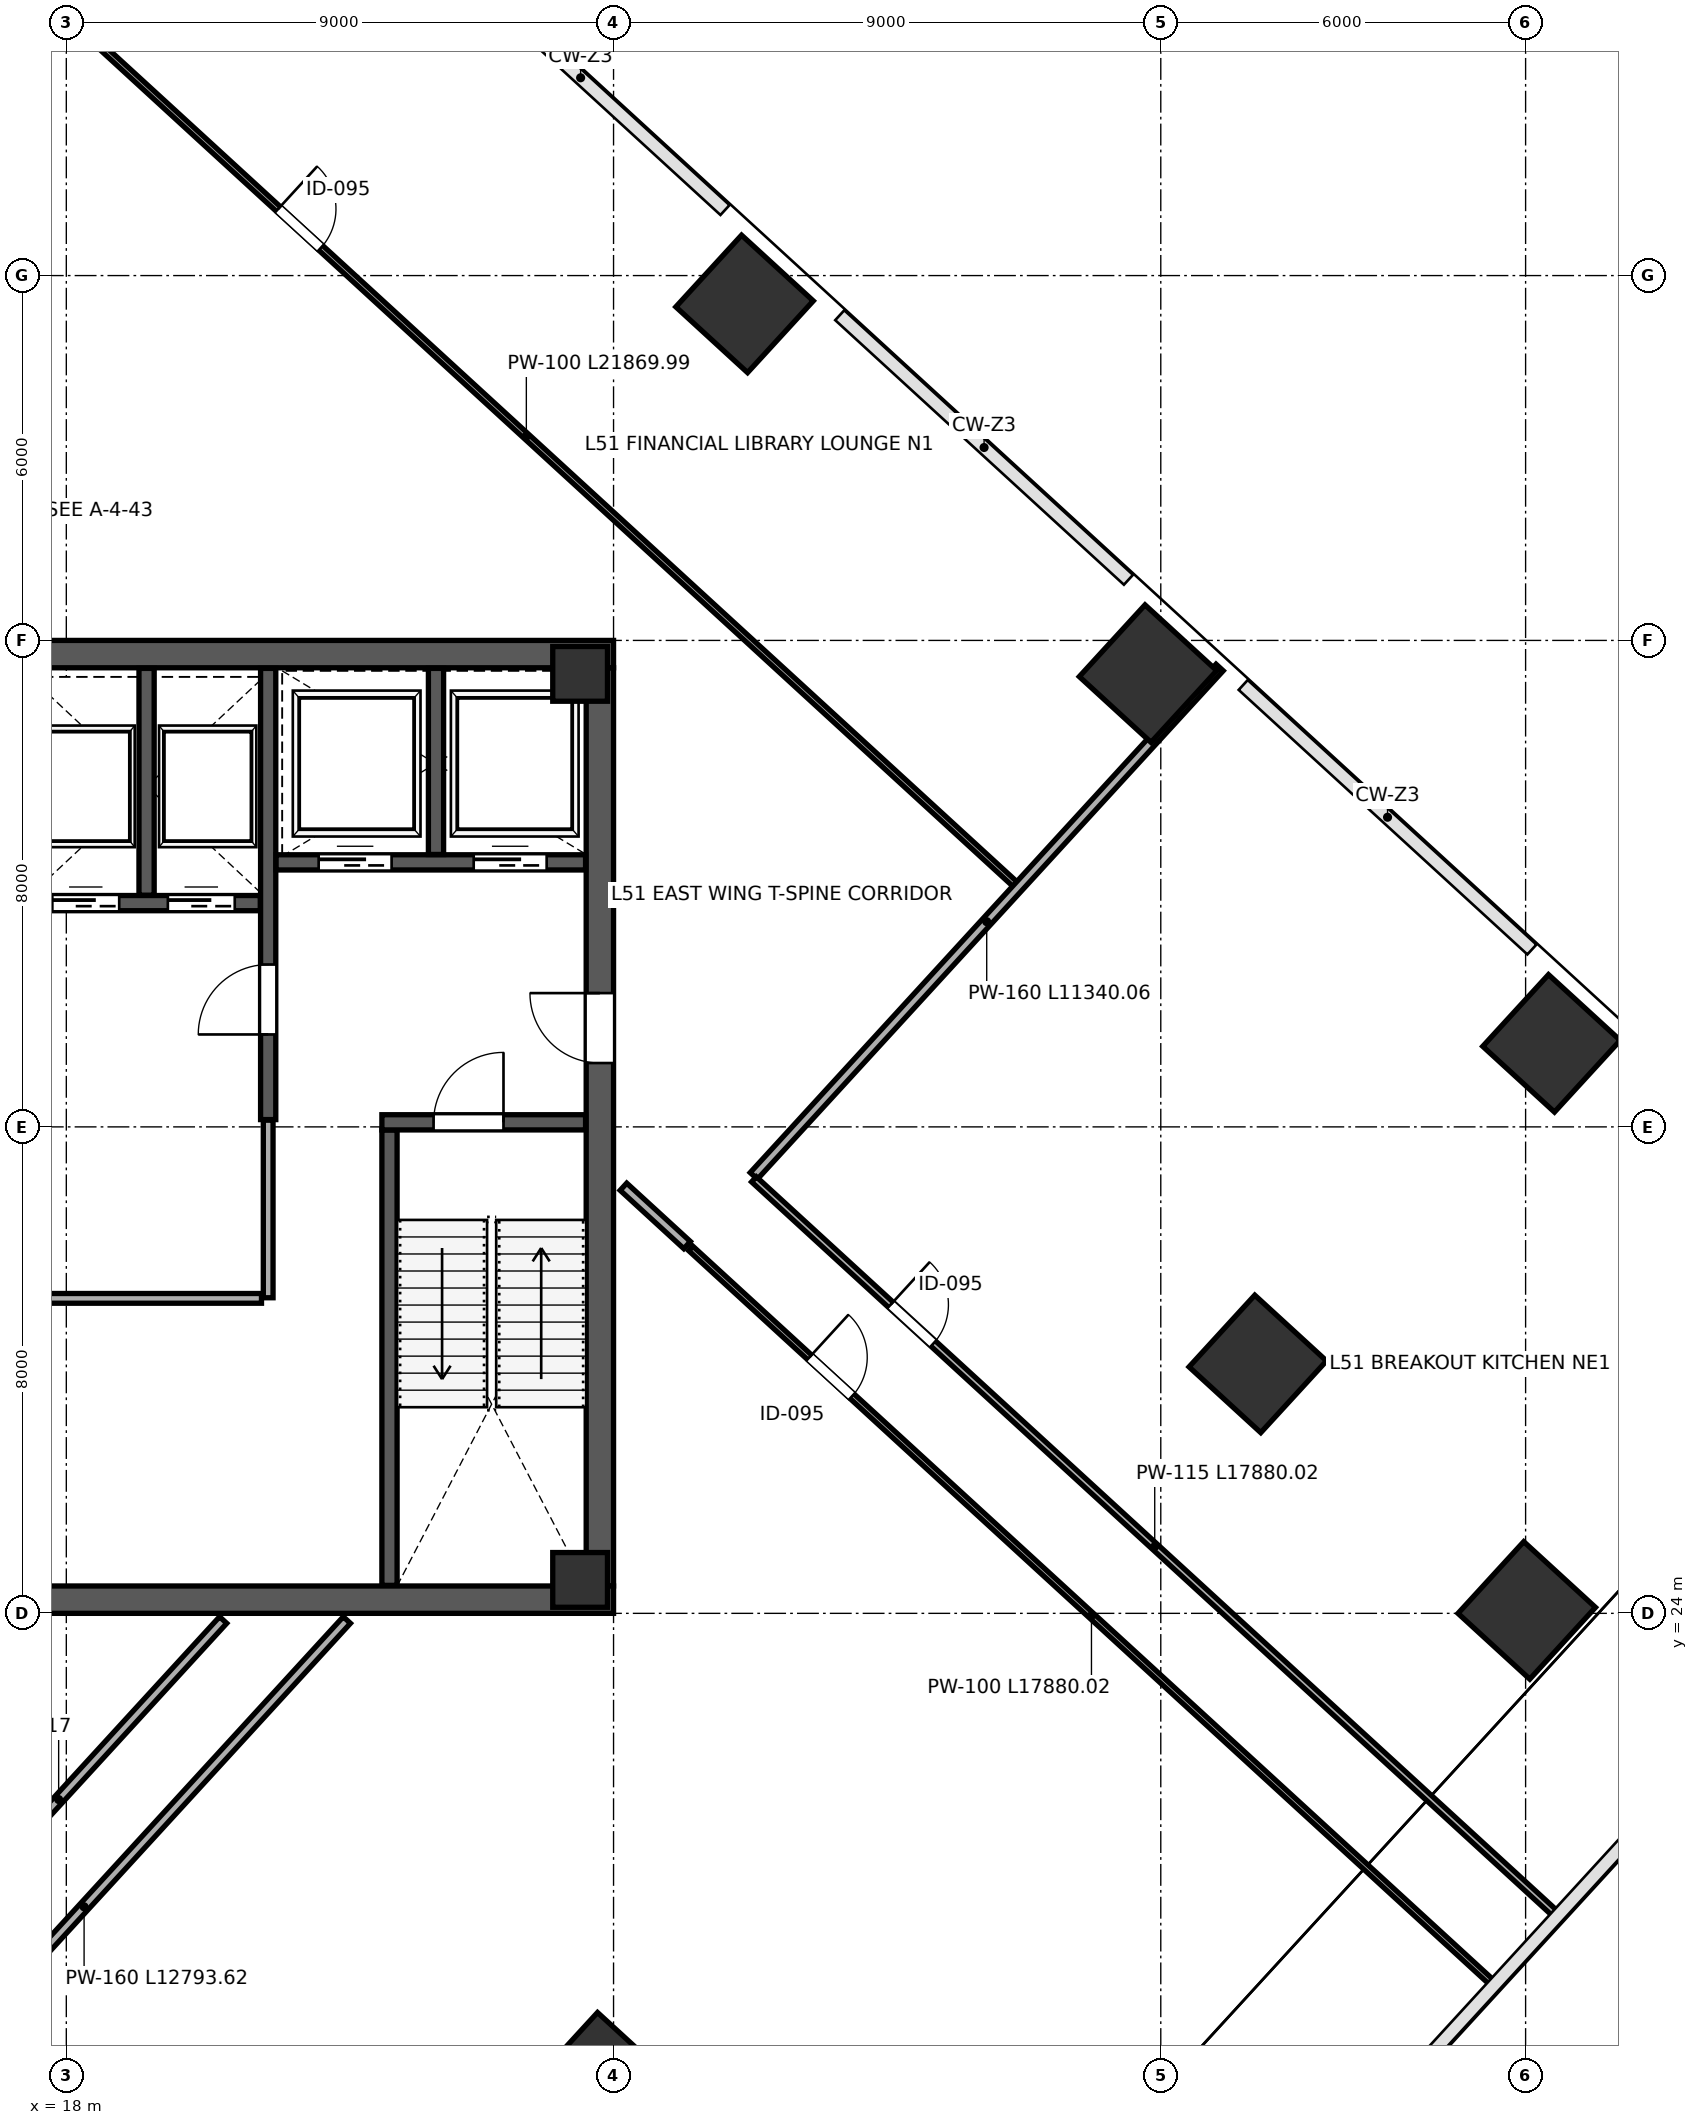
"""IFC4 building model, lengths in metres.
Left out: names, types, materials, properties, quantities, classifications, styles, units other than length and angle.
Written with IfcOpenShell. Run it as: python <this file> out.ifc"""

import sys

from ifc_helpers import new_model, si_unit, direction, frame, frame_2d, origin, origin_2d, place, context, subcontext, project, spatial, rectangle, extrude, source, transform, mapped, element, fill, save


model = new_model("IFC4")
c1 = context("Model", 3, precision=1e-05, world=origin(), true_north=direction((0.0, 1.0)))
c2 = subcontext(c1, "Body", "Model", "MODEL_VIEW")
j1 = project(units=[si_unit("LENGTHUNIT", "METRE"), si_unit("PLANEANGLEUNIT", "RADIAN")], contexts=[c1])
p1 = place(None, origin())
s1 = spatial("IfcSite", under=j1, at=p1, CompositionType="ELEMENT")
p2 = place(p1, origin())
s2 = spatial("IfcBuilding", under=s1, at=p2, CompositionType="ELEMENT")
p3 = place(p2, frame((0.0, 0.0, 229.0)))
s3 = spatial("IfcBuildingStorey", under=s2, at=p3, CompositionType="ELEMENT", Elevation=229.0)
m1 = source(origin(), c2, "Body", "SweptSolid", [
    extrude(rectangle(XDim=0.9, YDim=0.9, at=origin_2d()), origin(), (0.0, 0.0, 1.0), 4.198),
])
for number, where, z_axis, x_axis in (
    (1, (26.45, 24.55, 0.001), (0.0, 0.0, 1.0), (1.0, 0.0, 0.0)),
    (2, (26.45, 39.45, 0.001), (0.0, 0.0, 1.0), (1.0, 0.0, 0.0)),
):
    element("IfcColumn", number, at=place(p3, frame(where, z_axis=z_axis, x_axis=x_axis)), inside=s3, PredefinedType="COLUMN", context=c2, shape_type="MappedRepresentation", body=[
        mapped(m1, transform((0.0, 0.0, 0.0), scale=1.0)),
    ])
m2 = source(origin(), c2, "Body", "SweptSolid", [
    extrude(rectangle(XDim=1.6, YDim=1.6, at=origin_2d()), origin(), (0.0, 0.0, 1.0), 4.198),
])
for number, where, z_axis, x_axis in (
    (3, (29.155, 45.534, 0.001), (0.0, 0.0, 1.0), (-0.737, 0.676, 0.0)),
    (4, (35.79, 39.454, 0.001), (0.0, 0.0, 1.0), (-0.737, 0.676, 0.0)),
):
    element("IfcColumn", number, at=place(p3, frame(where, z_axis=z_axis, x_axis=x_axis)), inside=s3, PredefinedType="COLUMN", context=c2, shape_type="MappedRepresentation", body=[
        mapped(m2, transform((0.0, 0.0, 0.0), scale=1.0)),
    ])
m3 = source(origin(), c2, "Body", "SweptSolid", [
    extrude(rectangle(XDim=1.6, YDim=1.6, at=origin_2d()), origin(), (0.0, 0.0, 1.0), 4.198),
])
for number, where, z_axis, x_axis in (
    (5, (26.786, 16.306, 0.001), (0.0, 0.0, 1.0), (-0.737, 0.676, 0.0)),
    (6, (37.595, 28.102, 0.001), (0.0, 0.0, 1.0), (-0.737, 0.676, 0.0)),
):
    element("IfcColumn", number, at=place(p3, frame(where, z_axis=z_axis, x_axis=x_axis)), inside=s3, PredefinedType="COLUMN", context=c2, shape_type="MappedRepresentation", body=[
        mapped(m3, transform((0.0, 0.0, 0.0), scale=1.0)),
    ])
for number, where, z_axis, x_axis in (
    (7, (42.426, 33.374, 0.001), (0.0, 0.0, 1.0), (-0.737, 0.676, 0.0)),
    (8, (42.019, 24.049, 0.001), (0.0, 0.0, 1.0), (-0.737, 0.676, 0.0)),
):
    element("IfcColumn", number, at=place(p3, frame(where, z_axis=z_axis, x_axis=x_axis)), inside=s3, PredefinedType="COLUMN", context=c2, shape_type="MappedRepresentation", body=[
        mapped(m2, transform((0.0, 0.0, 0.0), scale=1.0)),
    ])
p4 = place(p3, frame((26.775, 24.45, 0.0), z_axis=(0.0, 0.0, 1.0), x_axis=(0.0, 1.0, 0.0)))
e9 = element("IfcWall", 9, at=p4, inside=s3, PredefinedType="SHEAR", context=c2, shape_type="SweptSolid", body=[
    extrude(rectangle(XDim=15.1, YDim=0.45, at=frame_2d((7.55, 0.0))), origin(), (0.0, 0.0, 1.0), 3.96),
])
p5 = place(p4, frame((8.6, 0.0, 0.0)))
e10 = element("IfcOpeningElement", 10, at=p5, cuts=e9, PredefinedType="OPENING", context=c2, shape_type="SweptSolid", body=[
    extrude(rectangle(XDim=1.15, YDim=2.2, at=frame_2d((0.575, 1.1))), frame((0.0, 0.235, 0.0), z_axis=(0.0, -1.0, 0.0), x_axis=(1.0, 0.0, 0.0)), (0.0, 0.0, 1.0), 0.47),
])
for number, where, z_axis, x_axis in (
    (11, (9.0, 24.225, 0.0), (0.0, 0.0, 1.0), (1.0, 0.0, 0.0)),
    (12, (9.0, 39.775, 0.0), (0.0, 0.0, 1.0), (1.0, 0.0, 0.0)),
):
    element("IfcWall", number, at=place(p3, frame(where, z_axis=z_axis, x_axis=x_axis)), inside=s3, PredefinedType="SHEAR", context=c2, shape_type="SweptSolid", body=[
        extrude(rectangle(XDim=18.0, YDim=0.45, at=frame_2d((9.0, 0.0))), origin(), (0.0, 0.0, 1.0), 3.96),
    ])
p6 = place(p3, frame((23.315, 24.46, 0.0), z_axis=(0.0, 0.0, 1.0), x_axis=(0.0, 1.0, 0.0)))
e13 = element("IfcWall", 13, at=p6, inside=s3, PredefinedType="SHEAR", context=c2, shape_type="SweptSolid", body=[
    extrude(rectangle(XDim=7.49, YDim=0.25, at=frame_2d((3.745, 0.0))), origin(), (0.0, 0.0, 1.0), 3.96),
])
p7 = place(p3, frame((23.19, 32.075, 0.0), z_axis=(0.0, 0.0, 1.0), x_axis=(1.0, 0.0, 0.0)))
e14 = element("IfcWall", 14, at=p7, inside=s3, PredefinedType="SHEAR", context=c2, shape_type="SweptSolid", body=[
    extrude(rectangle(XDim=3.35, YDim=0.25, at=frame_2d((1.675, 0.0))), origin(), (0.0, 0.0, 1.0), 3.96),
])
p8 = place(p7, frame((0.85, 0.0, 0.0)))
e15 = element("IfcOpeningElement", 15, at=p8, cuts=e14, PredefinedType="OPENING", context=c2, shape_type="SweptSolid", body=[
    extrude(rectangle(XDim=1.15, YDim=2.2, at=frame_2d((0.575, 1.1))), frame((0.0, 0.135, 0.0), z_axis=(0.0, -1.0, 0.0), x_axis=(1.0, 0.0, 0.0)), (0.0, 0.0, 1.0), 0.27),
])
p9 = place(p3, frame((21.32, 32.12, 0.0), z_axis=(0.0, 0.0, 1.0), x_axis=(0.0, 1.0, 0.0)))
e16 = element("IfcWall", 16, at=p9, inside=s3, PredefinedType="SHEAR", context=c2, shape_type="SweptSolid", body=[
    extrude(rectangle(XDim=7.42, YDim=0.25, at=frame_2d((3.71, 0.0))), origin(), (0.0, 0.0, 1.0), 3.96),
])
p10 = place(p9, frame((1.4, 0.0, 0.0)))
e17 = element("IfcOpeningElement", 17, at=p10, cuts=e16, PredefinedType="OPENING", context=c2, shape_type="SweptSolid", body=[
    extrude(rectangle(XDim=1.15, YDim=2.2, at=frame_2d((0.575, 1.1))), frame((0.0, 0.135, 0.0), z_axis=(0.0, -1.0, 0.0), x_axis=(1.0, 0.0, 0.0)), (0.0, 0.0, 1.0), 0.27),
])
p11 = place(p3, frame((21.45, 36.35, 0.0), z_axis=(0.0, 0.0, 1.0), x_axis=(1.0, 0.0, 0.0)))
e18 = element("IfcWall", 18, at=p11, inside=s3, PredefinedType="SHEAR", context=c2, shape_type="SweptSolid", body=[
    extrude(rectangle(XDim=5.09, YDim=0.25, at=frame_2d((2.545, 0.0))), origin(), (0.0, 0.0, 1.0), 3.96),
])
p12 = place(p11, frame((0.7, 0.0, 0.0)))
e19 = element("IfcOpeningElement", 19, at=p12, cuts=e18, PredefinedType="OPENING", context=c2, shape_type="SweptSolid", body=[
    extrude(rectangle(XDim=1.2, YDim=2.2, at=frame_2d((0.6, 1.1))), frame((0.0, 0.135, 0.0), z_axis=(0.0, -1.0, 0.0), x_axis=(1.0, 0.0, 0.0)), (0.0, 0.0, 1.0), 0.27),
])
p13 = place(p11, frame((3.25, 0.0, 0.0)))
e20 = element("IfcOpeningElement", 20, at=p13, cuts=e18, PredefinedType="OPENING", context=c2, shape_type="SweptSolid", body=[
    extrude(rectangle(XDim=1.2, YDim=2.2, at=frame_2d((0.6, 1.1))), frame((0.0, 0.135, 0.0), z_axis=(0.0, -1.0, 0.0), x_axis=(1.0, 0.0, 0.0)), (0.0, 0.0, 1.0), 0.27),
])
p14 = place(p3, frame((24.08, 36.48, 0.0), z_axis=(0.0, 0.0, 1.0), x_axis=(0.0, 1.0, 0.0)))
e21 = element("IfcWall", 21, at=p14, inside=s3, PredefinedType="SHEAR", context=c2, shape_type="SweptSolid", body=[
    extrude(rectangle(XDim=3.06, YDim=0.25, at=frame_2d((1.53, 0.0))), origin(), (0.0, 0.0, 1.0), 3.96),
])
p15 = place(p3, frame((17.32, 35.68, 0.0), z_axis=(0.0, 0.0, 1.0), x_axis=(1.0, 0.0, 0.0)))
e22 = element("IfcWall", 22, at=p15, inside=s3, PredefinedType="SHEAR", context=c2, shape_type="SweptSolid", body=[
    extrude(rectangle(XDim=3.87, YDim=0.25, at=frame_2d((1.935, 0.0))), origin(), (0.0, 0.0, 1.0), 3.96),
])
p16 = place(p15, frame((0.45, 0.0, 0.0)))
e23 = element("IfcOpeningElement", 23, at=p16, cuts=e22, PredefinedType="OPENING", context=c2, shape_type="SweptSolid", body=[
    extrude(rectangle(XDim=1.1, YDim=2.2, at=frame_2d((0.55, 1.1))), frame((0.0, 0.135, 0.0), z_axis=(0.0, -1.0, 0.0), x_axis=(1.0, 0.0, 0.0)), (0.0, 0.0, 1.0), 0.27),
])
p17 = place(p15, frame((2.35, 0.0, 0.0)))
e24 = element("IfcOpeningElement", 24, at=p17, cuts=e22, PredefinedType="OPENING", context=c2, shape_type="SweptSolid", body=[
    extrude(rectangle(XDim=1.1, YDim=2.2, at=frame_2d((0.55, 1.1))), frame((0.0, 0.135, 0.0), z_axis=(0.0, -1.0, 0.0), x_axis=(1.0, 0.0, 0.0)), (0.0, 0.0, 1.0), 0.27),
])
p18 = place(p3, frame((19.32, 35.81, 0.0), z_axis=(0.0, 0.0, 1.0), x_axis=(0.0, 1.0, 0.0)))
e25 = element("IfcWall", 25, at=p18, inside=s3, PredefinedType="SHEAR", context=c2, shape_type="SweptSolid", body=[
    extrude(rectangle(XDim=3.73, YDim=0.25, at=frame_2d((1.865, 0.0))), origin(), (0.0, 0.0, 1.0), 3.96),
])
p19 = place(p3, frame((12.84, 29.18, 0.0), z_axis=(0.0, 0.0, 1.0), x_axis=(1.0, 0.0, 0.0)))
e26 = element("IfcWall", 26, at=p19, inside=s3, PredefinedType="PARTITIONING", context=c2, shape_type="SweptSolid", body=[
    extrude(rectangle(XDim=8.37, YDim=0.16, at=frame_2d((4.185, 0.0))), origin(), (0.0, 0.0, 1.0), 3.96),
])
p20 = place(p19, frame((2.6, 0.0, 0.0)))
e27 = element("IfcOpeningElement", 27, at=p20, cuts=e26, PredefinedType="OPENING", context=c2, shape_type="SweptSolid", body=[
    extrude(rectangle(XDim=0.9, YDim=2.15, at=frame_2d((0.45, 1.075))), frame((0.0, 0.09, 0.0), z_axis=(0.0, -1.0, 0.0), x_axis=(1.0, 0.0, 0.0)), (0.0, 0.0, 1.0), 0.18),
])
p21 = place(p3, frame((21.32, 29.19, 0.0), z_axis=(0.0, 0.0, 1.0), x_axis=(0.0, 1.0, 0.0)))
e28 = element("IfcWall", 28, at=p21, inside=s3, PredefinedType="PARTITIONING", context=c2, shape_type="SweptSolid", body=[
    extrude(rectangle(XDim=2.92, YDim=0.16, at=frame_2d((1.46, 0.0))), origin(), (0.0, 0.0, 1.0), 3.96),
])
p22 = place(p3, frame((15.168, 17.986, 0.0), z_axis=(0.0, 0.0, 1.0), x_axis=(0.675616954369, 0.737252827034, 0.0)))
e29 = element("IfcWall", 29, at=p22, inside=s3, PredefinedType="PARTITIONING", context=c2, shape_type="SweptSolid", body=[
    extrude(rectangle(XDim=8.009, YDim=0.16, at=frame_2d((4.005, 0.0))), origin(), (0.0, 0.0, 1.0), 3.96),
])
p23 = place(p3, frame((27.163, 31.016, 0.0), z_axis=(0.0, 0.0, 1.0), x_axis=(0.737296869908, -0.675568890361, 0.0)))
e30 = element("IfcWall", 30, at=p23, inside=s3, PredefinedType="PARTITIONING", context=c2, shape_type="SweptSolid", body=[
    extrude(rectangle(XDim=1.42, YDim=0.16, at=frame_2d((0.71, 0.0))), origin(), (0.0, 0.0, 1.0), 3.96),
])
p24 = place(p3, frame((17.504, 50.744, 0.0), z_axis=(0.0, 0.0, 1.0), x_axis=(0.737277850523, -0.675589646996, 0.0)))
e31 = element("IfcWall", 31, at=p24, inside=s3, PredefinedType="PARTITIONING", context=c2, shape_type="SweptSolid", body=[
    extrude(rectangle(XDim=21.87, YDim=0.1, at=frame_2d((10.935, 0.0))), origin(), (0.0, 0.0, 1.0), 3.96),
])
p25 = place(p24, frame((5.4, 0.0, 0.0)))
e32 = element("IfcOpeningElement", 32, at=p25, cuts=e31, PredefinedType="OPENING", context=c2, shape_type="SweptSolid", body=[
    extrude(rectangle(XDim=0.95, YDim=2.15, at=frame_2d((0.475, 1.075))), frame((0.0, 0.06, 0.0), z_axis=(0.0, -1.0, 0.0), x_axis=(1.0, 0.0, 0.0)), (0.0, 0.0, 1.0), 0.12),
])
p26 = place(p3, frame((1.73, 32.85, 0.0), z_axis=(0.0, 0.0, 1.0), x_axis=(0.675589845589, 0.737277668546, 0.0)))
e33 = element("IfcWall", 33, at=p26, inside=s3, PredefinedType="PARTITIONING", context=c2, shape_type="SweptSolid", body=[
    extrude(rectangle(XDim=26.742, YDim=0.115, at=frame_2d((13.371, 0.0))), origin(), (0.0, 0.0, 1.0), 3.96),
])
p27 = place(p3, frame((29.307, 31.194, 0.0), z_axis=(0.0, 0.0, 1.0), x_axis=(0.67558228032, 0.73728460076, 0.0)))
e34 = element("IfcWall", 34, at=p27, inside=s3, PredefinedType="PARTITIONING", context=c2, shape_type="SweptSolid", body=[
    extrude(rectangle(XDim=11.34, YDim=0.16, at=frame_2d((5.67, 0.0))), origin(), (0.0, 0.0, 1.0), 3.195),
])
p28 = place(p3, frame((13.971, 14.458, 0.0), z_axis=(0.0, 0.0, 1.0), x_axis=(0.675595861889, 0.737272155583, 0.0)))
e35 = element("IfcWall", 35, at=p28, inside=s3, PredefinedType="PARTITIONING", context=c2, shape_type="SweptSolid", body=[
    extrude(rectangle(XDim=12.794, YDim=0.16, at=frame_2d((6.397, 0.0))), origin(), (0.0, 0.0, 1.0), 3.96),
])
p29 = place(p3, frame((29.309, 31.138, 0.0), z_axis=(0.0, 0.0, 1.0), x_axis=(0.737278819957, -0.675588589041, 0.0)))
e36 = element("IfcWall", 36, at=p29, inside=s3, PredefinedType="PARTITIONING", context=c2, shape_type="SweptSolid", body=[
    extrude(rectangle(XDim=17.88, YDim=0.115, at=frame_2d((8.94, 0.0))), origin(), (0.0, 0.0, 1.0), 3.252),
])
p30 = place(p29, frame((3.05, 0.0, 0.0)))
e37 = element("IfcOpeningElement", 37, at=p30, cuts=e36, PredefinedType="OPENING", context=c2, shape_type="SweptSolid", body=[
    extrude(rectangle(XDim=0.95, YDim=2.15, at=frame_2d((0.475, 1.075))), frame((0.0, 0.067, 0.0), z_axis=(0.0, -1.0, 0.0), x_axis=(1.0, 0.0, 0.0)), (0.0, 0.0, 1.0), 0.135),
])
p31 = place(p3, frame((28.269, 30.002, 0.0), z_axis=(0.0, 0.0, 1.0), x_axis=(0.737272587758, -0.67559539026, 0.0)))
e38 = element("IfcWall", 38, at=p31, inside=s3, PredefinedType="PARTITIONING", context=c2, shape_type="SweptSolid", body=[
    extrude(rectangle(XDim=17.88, YDim=0.1, at=frame_2d((8.94, 0.0))), origin(), (0.0, 0.0, 1.0), 3.252),
])
p32 = place(p31, frame((2.65, 0.0, 0.0)))
e39 = element("IfcOpeningElement", 39, at=p32, cuts=e38, PredefinedType="OPENING", context=c2, shape_type="SweptSolid", body=[
    extrude(rectangle(XDim=0.95, YDim=2.15, at=frame_2d((0.475, 1.075))), frame((0.0, 0.06, 0.0), z_axis=(0.0, -1.0, 0.0), x_axis=(1.0, 0.0, 0.0)), (0.0, 0.0, 1.0), 0.12),
])
m4 = source(origin(), c2, "Body", "SweptSolid", [
    extrude(rectangle(XDim=1.15, YDim=2.2, at=frame_2d((0.575, 1.1))), frame((0.0, 0.025, 0.0), z_axis=(0.0, -1.0, 0.0), x_axis=(1.0, 0.0, 0.0)), (0.0, 0.0, 1.0), 0.05),
])
p33 = place(p10, origin())
e40 = element("IfcDoor", 40, at=p33, inside=s3, OperationType="SINGLE_SWING_LEFT", PredefinedType="DOOR", context=c2, shape_type="MappedRepresentation", body=[
    mapped(m4, transform((0.0, 0.0, 0.0), scale=1.0)),
])
fill(e17, e40)
m5 = source(origin(), c2, "Body", "SweptSolid", [
    extrude(rectangle(XDim=1.15, YDim=2.2, at=frame_2d((0.575, 1.1))), frame((0.0, 0.025, 0.0), z_axis=(0.0, -1.0, 0.0), x_axis=(1.0, 0.0, 0.0)), (0.0, 0.0, 1.0), 0.05),
])
p34 = place(p8, origin())
e41 = element("IfcDoor", 41, at=p34, inside=s3, OperationType="SINGLE_SWING_RIGHT", PredefinedType="DOOR", context=c2, shape_type="MappedRepresentation", body=[
    mapped(m5, transform((0.0, 0.0, 0.0), scale=1.0)),
])
fill(e15, e41)
p35 = place(p5, origin())
e42 = element("IfcDoor", 42, at=p35, inside=s3, OperationType="SINGLE_SWING_RIGHT", PredefinedType="DOOR", context=c2, shape_type="MappedRepresentation", body=[
    mapped(m4, transform((0.0, 0.0, 0.0), scale=1.0)),
])
fill(e10, e42)
m6 = source(origin(), c2, "Body", "SweptSolid", [
    extrude(rectangle(XDim=1.1, YDim=2.2, at=frame_2d((0.55, 1.1))), frame((0.0, 0.025, 0.0), z_axis=(0.0, -1.0, 0.0), x_axis=(1.0, 0.0, 0.0)), (0.0, 0.0, 1.0), 0.05),
])
p36 = place(p16, origin())
e43 = element("IfcDoor", 43, at=p36, inside=s3, OperationType="SLIDING_TO_LEFT", PredefinedType="DOOR", context=c2, shape_type="MappedRepresentation", body=[
    mapped(m6, transform((0.0, 0.0, 0.0), scale=1.0)),
])
fill(e23, e43)
p37 = place(p17, origin())
e44 = element("IfcDoor", 44, at=p37, inside=s3, OperationType="SLIDING_TO_RIGHT", PredefinedType="DOOR", context=c2, shape_type="MappedRepresentation", body=[
    mapped(m6, transform((0.0, 0.0, 0.0), scale=1.0)),
])
fill(e24, e44)
m7 = source(origin(), c2, "Body", "SweptSolid", [
    extrude(rectangle(XDim=1.2, YDim=2.2, at=frame_2d((0.6, 1.1))), frame((0.0, 0.025, 0.0), z_axis=(0.0, -1.0, 0.0), x_axis=(1.0, 0.0, 0.0)), (0.0, 0.0, 1.0), 0.05),
])
p38 = place(p12, origin())
e45 = element("IfcDoor", 45, at=p38, inside=s3, OperationType="SLIDING_TO_LEFT", PredefinedType="DOOR", context=c2, shape_type="MappedRepresentation", body=[
    mapped(m7, transform((0.0, 0.0, 0.0), scale=1.0)),
])
fill(e19, e45)
p39 = place(p13, origin())
e46 = element("IfcDoor", 46, at=p39, inside=s3, OperationType="SLIDING_TO_RIGHT", PredefinedType="DOOR", context=c2, shape_type="MappedRepresentation", body=[
    mapped(m7, transform((0.0, 0.0, 0.0), scale=1.0)),
])
fill(e20, e46)
m8 = source(origin(), c2, "Body", "SweptSolid", [
    extrude(rectangle(XDim=0.95, YDim=2.15, at=frame_2d((0.475, 1.075))), frame((0.0, 0.025, 0.0), z_axis=(0.0, -1.0, 0.0), x_axis=(1.0, 0.0, 0.0)), (0.0, 0.0, 1.0), 0.05),
])
p40 = place(p25, origin())
e47 = element("IfcDoor", 47, at=p40, inside=s3, OperationType="SINGLE_SWING_LEFT", PredefinedType="DOOR", context=c2, shape_type="MappedRepresentation", body=[
    mapped(m8, transform((0.0, 0.0, 0.0), scale=1.0)),
])
fill(e32, e47)
p41 = place(p30, origin())
e48 = element("IfcDoor", 48, at=p41, inside=s3, OperationType="SINGLE_SWING_LEFT", PredefinedType="DOOR", context=c2, shape_type="MappedRepresentation", body=[
    mapped(m8, transform((0.0, 0.0, 0.0), scale=1.0)),
])
fill(e37, e48)
p42 = place(p32, origin())
e49 = element("IfcDoor", 49, at=p42, inside=s3, OperationType="SINGLE_SWING_LEFT", PredefinedType="DOOR", context=c2, shape_type="MappedRepresentation", body=[
    mapped(m8, transform((0.0, 0.0, 0.0), scale=1.0)),
])
fill(e39, e49)
save(model, sys.argv[1])
